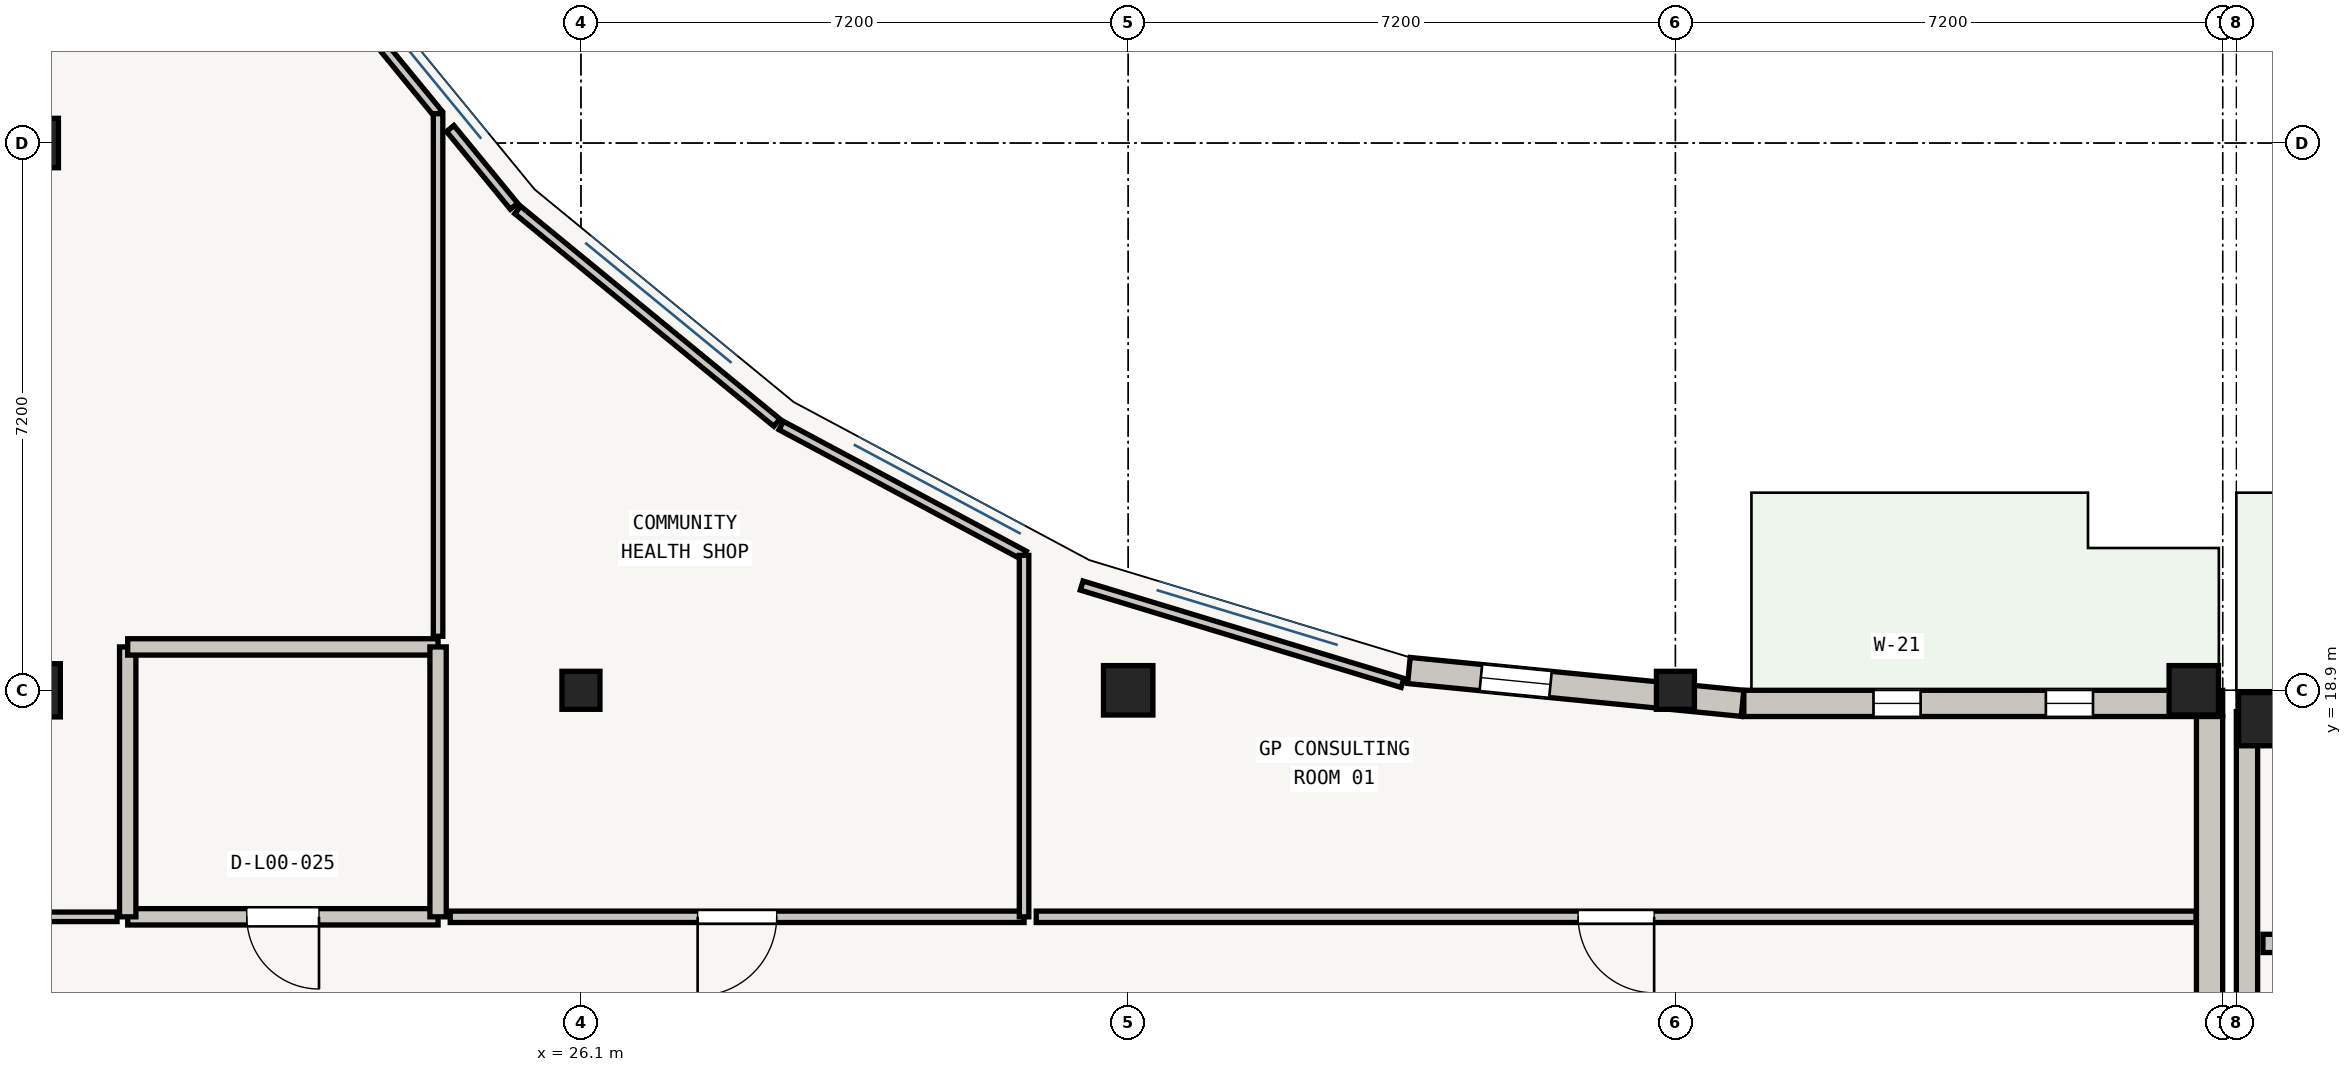
"""IFC4 building model, lengths in metres.
Left out: names, types, materials, properties, quantities, classifications, styles, units other than length and angle.
Written with IfcOpenShell. Run it as: python <this file> out.ifc"""

import sys

from ifc_helpers import new_model, si_unit, direction, frame, frame_2d, origin, origin_2d, place, context, subcontext, project, spatial, rectangle, extrude, element, fill, save


model = new_model("IFC4")
c1 = context("Model", 3, precision=1e-05, world=origin(), true_north=direction((0.0, 1.0)))
c2 = subcontext(c1, "Body", "Model", "MODEL_VIEW")
j1 = project(units=[si_unit("LENGTHUNIT", "METRE"), si_unit("PLANEANGLEUNIT", "RADIAN")], contexts=[c1])
p1 = place(None, origin())
s1 = spatial("IfcSite", under=j1, at=p1, CompositionType="ELEMENT")
p2 = place(p1, origin())
s2 = spatial("IfcBuilding", under=s1, at=p2, CompositionType="ELEMENT")
p3 = place(p2, origin())
s3 = spatial("IfcBuildingStorey", under=s2, at=p3, CompositionType="ELEMENT", Elevation=0.0)
p4 = place(p3, frame((18.9, 18.9, 0.0), z_axis=(0.0, 0.0, 1.0), x_axis=(1.0, 0.0, 0.0)))
e1 = element("IfcColumn", 1, at=p4, inside=s3, PredefinedType="COLUMN", context=c2, shape_type="SweptSolid", body=[
    extrude(rectangle(XDim=0.7, YDim=0.7, at=origin_2d()), origin(), (0.0, 0.0, 1.0), 4.22),
])
p5 = place(p3, frame((18.9, 26.1, 0.0), z_axis=(0.0, 0.0, 1.0), x_axis=(1.0, 0.0, 0.0)))
e2 = element("IfcColumn", 2, at=p5, inside=s3, PredefinedType="COLUMN", context=c2, shape_type="SweptSolid", body=[
    extrude(rectangle(XDim=0.65, YDim=0.65, at=origin_2d()), origin(), (0.0, 0.0, 1.0), 4.22),
])
p6 = place(p3, frame((26.1, 18.9, 0.0), z_axis=(0.0, 0.0, 1.0), x_axis=(1.0, 0.0, 0.0)))
e3 = element("IfcColumn", 3, at=p6, inside=s3, PredefinedType="COLUMN", context=c2, shape_type="SweptSolid", body=[
    extrude(rectangle(XDim=0.5, YDim=0.5, at=origin_2d()), origin(), (0.0, 0.0, 1.0), 4.22),
])
p7 = place(p3, frame((33.3, 18.9, 0.0), z_axis=(0.0, 0.0, 1.0), x_axis=(1.0, 0.0, 0.0)))
e4 = element("IfcColumn", 4, at=p7, inside=s3, PredefinedType="COLUMN", context=c2, shape_type="SweptSolid", body=[
    extrude(rectangle(XDim=0.65, YDim=0.65, at=origin_2d()), origin(), (0.0, 0.0, 1.0), 4.22),
])
p8 = place(p3, frame((40.5, 18.9, 0.0), z_axis=(0.0, 0.0, 1.0), x_axis=(1.0, 0.0, 0.0)))
e5 = element("IfcColumn", 5, at=p8, inside=s3, PredefinedType="COLUMN", context=c2, shape_type="SweptSolid", body=[
    extrude(rectangle(XDim=0.5, YDim=0.5, at=origin_2d()), origin(), (0.0, 0.0, 1.0), 4.22),
])
p9 = place(p3, frame((47.32, 18.9, 0.0), z_axis=(0.0, 0.0, 1.0), x_axis=(1.0, 0.0, 0.0)))
e6 = element("IfcColumn", 6, at=p9, inside=s3, PredefinedType="COLUMN", context=c2, shape_type="SweptSolid", body=[
    extrude(rectangle(XDim=0.65, YDim=0.65, at=origin_2d()), origin(), (0.0, 0.0, 1.0), 4.22),
])
p10 = place(p3, frame((48.26, 18.52, 0.0), z_axis=(0.0, 0.0, 1.0), x_axis=(1.0, 0.0, 0.0)))
e7 = element("IfcColumn", 7, at=p10, inside=s3, PredefinedType="COLUMN", context=c2, shape_type="SweptSolid", body=[
    extrude(rectangle(XDim=0.7, YDim=0.7, at=origin_2d()), origin(), (0.0, 0.0, 1.0), 4.185),
])
p11 = place(p3, frame((36.994, 19.161, 0.0), z_axis=(0.0, 0.0, 1.0), x_axis=(0.995183522218, -0.098029368588, 0.0)))
e8 = element("IfcWall", 8, at=p11, inside=s3, PredefinedType="SOLIDWALL", context=c2, shape_type="SweptSolid", body=[
    extrude(rectangle(XDim=4.411, YDim=0.345, at=frame_2d((2.205, 0.0))), origin(), (0.0, 0.0, 1.0), 3.255),
])
p12 = place(p11, frame((0.951, 0.0, 0.55)))
e9 = element("IfcOpeningElement", 9, at=p12, cuts=e8, PredefinedType="OPENING", context=c2, shape_type="SweptSolid", body=[
    extrude(rectangle(XDim=0.92, YDim=2.1, at=frame_2d((0.46, 1.05))), frame((0.0, 0.172, 0.0), z_axis=(0.0, -1.0, 0.0), x_axis=(1.0, 0.0, 0.0)), (0.0, 0.0, 1.0), 0.345),
])
p13 = place(p3, frame((41.4, 18.728, 0.0), z_axis=(0.0, 0.0, 1.0), x_axis=(1.0, 0.0, 0.0)))
e10 = element("IfcWall", 10, at=p13, inside=s3, PredefinedType="SOLIDWALL", context=c2, shape_type="SweptSolid", body=[
    extrude(rectangle(XDim=6.3, YDim=0.345, at=frame_2d((3.15, 0.0))), origin(), (0.0, 0.0, 1.0), 3.625),
])
p14 = place(p13, frame((1.706, 0.0, 0.55)))
e11 = element("IfcOpeningElement", 11, at=p14, cuts=e10, PredefinedType="OPENING", context=c2, shape_type="SweptSolid", body=[
    extrude(rectangle(XDim=0.62, YDim=2.08, at=frame_2d((0.31, 1.04))), frame((0.0, 0.172, 0.0), z_axis=(0.0, -1.0, 0.0), x_axis=(1.0, 0.0, 0.0)), (0.0, 0.0, 1.0), 0.345),
])
p15 = place(p13, frame((3.974, 0.0, 0.55)))
e12 = element("IfcOpeningElement", 12, at=p15, cuts=e10, PredefinedType="OPENING", context=c2, shape_type="SweptSolid", body=[
    extrude(rectangle(XDim=0.62, YDim=2.08, at=frame_2d((0.31, 1.04))), frame((0.0, 0.172, 0.0), z_axis=(0.0, -1.0, 0.0), x_axis=(1.0, 0.0, 0.0)), (0.0, 0.0, 1.0), 0.345),
])
p16 = place(p3, frame((47.528, 18.555, 0.0), z_axis=(0.0, 0.0, 1.0), x_axis=(0.0, -1.0, 0.0)))
e13 = element("IfcWall", 13, at=p16, inside=s3, PredefinedType="SOLIDWALL", context=c2, shape_type="SweptSolid", body=[
    extrude(rectangle(XDim=6.855, YDim=0.345, at=frame_2d((3.427, 0.0))), origin(), (0.0, 0.0, 1.0), 3.605),
])
p17 = place(p3, frame((48.02, 11.7, 0.0), z_axis=(0.0, 0.0, 1.0), x_axis=(0.0, 1.0, 0.0)))
e14 = element("IfcWall", 14, at=p17, inside=s3, PredefinedType="STANDARD", context=c2, shape_type="SweptSolid", body=[
    extrude(rectangle(XDim=6.92, YDim=0.28, at=frame_2d((3.46, 0.0))), origin(), (0.0, 0.0, 1.0), 3.55),
])
p18 = place(p3, frame((24.22, 15.92, 0.0), z_axis=(0.0, 0.0, 1.0), x_axis=(-1.0, 0.0, 0.0)))
e15 = element("IfcWall", 15, at=p18, inside=s3, PredefinedType="PLUMBINGWALL", context=c2, shape_type="SweptSolid", body=[
    extrude(rectangle(XDim=4.083, YDim=0.215, at=frame_2d((2.042, 0.0))), origin(), (0.0, 0.0, 1.0), 3.24),
])
p19 = place(p18, frame((1.567, 0.0, 0.0)))
e16 = element("IfcOpeningElement", 16, at=p19, cuts=e15, PredefinedType="OPENING", context=c2, shape_type="SweptSolid", body=[
    extrude(rectangle(XDim=0.95, YDim=2.05, at=frame_2d((0.475, 1.025))), frame((0.0, 0.107, 0.0), z_axis=(0.0, -1.0, 0.0), x_axis=(1.0, 0.0, 0.0)), (0.0, 0.0, 1.0), 0.215),
])
p20 = place(p3, frame((20.136, 15.92, 0.0), z_axis=(0.0, 0.0, 1.0), x_axis=(0.0, 1.0, 0.0)))
e17 = element("IfcWall", 17, at=p20, inside=s3, PredefinedType="PLUMBINGWALL", context=c2, shape_type="SweptSolid", body=[
    extrude(rectangle(XDim=3.551, YDim=0.215, at=frame_2d((1.775, 0.0))), origin(), (0.0, 0.0, 1.0), 3.24),
])
p21 = place(p3, frame((20.136, 19.471, 0.0), z_axis=(0.0, 0.0, 1.0), x_axis=(1.0, 0.0, 0.0)))
e18 = element("IfcWall", 18, at=p21, inside=s3, PredefinedType="PLUMBINGWALL", context=c2, shape_type="SweptSolid", body=[
    extrude(rectangle(XDim=4.083, YDim=0.215, at=frame_2d((2.042, 0.0))), origin(), (0.0, 0.0, 1.0), 3.24),
])
p22 = place(p3, frame((24.22, 19.471, 0.0), z_axis=(0.0, 0.0, 1.0), x_axis=(0.0, -1.0, 0.0)))
e19 = element("IfcWall", 19, at=p22, inside=s3, PredefinedType="PLUMBINGWALL", context=c2, shape_type="SweptSolid", body=[
    extrude(rectangle(XDim=3.551, YDim=0.215, at=frame_2d((1.775, 0.0))), origin(), (0.0, 0.0, 1.0), 3.24),
])
p23 = place(p3, frame((22.421, 28.678, 0.0), z_axis=(0.0, 0.0, 1.0), x_axis=(0.634381268995, -0.773020313801, 0.0)))
e20 = element("IfcWall", 20, at=p23, inside=s3, PredefinedType="PARTITIONING", context=c2, shape_type="SweptSolid", body=[
    extrude(rectangle(XDim=2.835, YDim=0.125, at=frame_2d((1.417, 0.0))), origin(), (0.0, 0.0, 1.0), 3.24),
])
p24 = place(p3, frame((24.22, 26.486, 0.0), z_axis=(0.0, 0.0, 1.0), x_axis=(0.0, -1.0, 0.0)))
e21 = element("IfcWall", 21, at=p24, inside=s3, PredefinedType="PARTITIONING", context=c2, shape_type="SweptSolid", body=[
    extrude(rectangle(XDim=6.875, YDim=0.125, at=frame_2d((3.438, 0.0))), origin(), (0.0, 0.0, 1.0), 3.24),
])
p25 = place(p3, frame((19.997, 15.92, 0.0), z_axis=(0.0, 0.0, 1.0), x_axis=(-1.0, 0.0, 0.0)))
e22 = element("IfcWall", 22, at=p25, inside=s3, PredefinedType="PARTITIONING", context=c2, shape_type="SweptSolid", body=[
    extrude(rectangle(XDim=3.327, YDim=0.125, at=frame_2d((1.663, 0.0))), origin(), (0.0, 0.0, 1.0), 3.24),
])
p26 = place(p3, frame((31.93, 15.92, 0.0), z_axis=(0.0, 0.0, 1.0), x_axis=(-1.0, 0.0, 0.0)))
e23 = element("IfcWall", 23, at=p26, inside=s3, PredefinedType="PARTITIONING", context=c2, shape_type="SweptSolid", body=[
    extrude(rectangle(XDim=7.55, YDim=0.15, at=frame_2d((3.775, 0.0))), origin(), (0.0, 0.0, 1.0), 3.24),
])
p27 = place(p26, frame((3.255, 0.0, 0.0)))
e24 = element("IfcOpeningElement", 24, at=p27, cuts=e23, PredefinedType="OPENING", context=c2, shape_type="SweptSolid", body=[
    extrude(rectangle(XDim=1.04, YDim=2.05, at=frame_2d((0.52, 1.025))), frame((0.0, 0.075, 0.0), z_axis=(0.0, -1.0, 0.0), x_axis=(1.0, 0.0, 0.0)), (0.0, 0.0, 1.0), 0.15),
])
p28 = place(p3, frame((25.268, 25.219, 0.0), z_axis=(0.0, 0.0, 1.0), x_axis=(0.773026739032, -0.634373439499, 0.0)))
e25 = element("IfcWall", 25, at=p28, inside=s3, PredefinedType="PARTITIONING", context=c2, shape_type="SweptSolid", body=[
    extrude(rectangle(XDim=4.411, YDim=0.125, at=frame_2d((2.206, 0.0))), origin(), (0.0, 0.0, 1.0), 3.24),
])
p29 = place(p3, frame((28.735, 22.383, 0.0), z_axis=(0.0, 0.0, 1.0), x_axis=(0.881912348796, -0.471413416273, 0.0)))
e26 = element("IfcWall", 26, at=p29, inside=s3, PredefinedType="PARTITIONING", context=c2, shape_type="SweptSolid", body=[
    extrude(rectangle(XDim=3.623, YDim=0.125, at=frame_2d((1.812, 0.0))), origin(), (0.0, 0.0, 1.0), 3.24),
])
p30 = place(p3, frame((31.93, 20.675, 0.0), z_axis=(0.0, 0.0, 1.0), x_axis=(0.0, -1.0, 0.0)))
e27 = element("IfcWall", 27, at=p30, inside=s3, PredefinedType="PARTITIONING", context=c2, shape_type="SweptSolid", body=[
    extrude(rectangle(XDim=4.755, YDim=0.125, at=frame_2d((2.378, 0.0))), origin(), (0.0, 0.0, 1.0), 3.24),
])
p31 = place(p3, frame((24.38, 26.291, 0.0), z_axis=(0.0, 0.0, 1.0), x_axis=(0.634432512687, -0.77297825768, 0.0)))
e28 = element("IfcWall", 28, at=p31, inside=s3, PredefinedType="PARTITIONING", context=c2, shape_type="SweptSolid", body=[
    extrude(rectangle(XDim=1.323, YDim=0.125, at=frame_2d((0.662, 0.0))), origin(), (0.0, 0.0, 1.0), 3.24),
])
p32 = place(p3, frame((47.35, 15.92, 0.0), z_axis=(0.0, 0.0, 1.0), x_axis=(-1.0, 0.0, 0.0)))
e29 = element("IfcWall", 29, at=p32, inside=s3, PredefinedType="PARTITIONING", context=c2, shape_type="SweptSolid", body=[
    extrude(rectangle(XDim=15.26, YDim=0.15, at=frame_2d((7.63, 0.0))), origin(), (0.0, 0.0, 1.0), 3.24),
])
p33 = place(p32, frame((7.13, 0.0, 0.0)))
e30 = element("IfcOpeningElement", 30, at=p33, cuts=e29, PredefinedType="OPENING", context=c2, shape_type="SweptSolid", body=[
    extrude(rectangle(XDim=1.0, YDim=2.05, at=frame_2d((0.5, 1.025))), frame((0.0, 0.075, 0.0), z_axis=(0.0, -1.0, 0.0), x_axis=(1.0, 0.0, 0.0)), (0.0, 0.0, 1.0), 0.15),
])
p34 = place(p3, frame((32.688, 20.278, 0.0), z_axis=(0.0, 0.0, 1.0), x_axis=(0.956933582882, -0.290306937487, 0.0)))
e31 = element("IfcWall", 31, at=p34, inside=s3, PredefinedType="PARTITIONING", context=c2, shape_type="SweptSolid", body=[
    extrude(rectangle(XDim=4.411, YDim=0.125, at=frame_2d((2.206, 0.0))), origin(), (0.0, 0.0, 1.0), 3.24),
])
p35 = place(p3, frame((105.13, 15.57, 0.0), z_axis=(0.0, 0.0, 1.0), x_axis=(-1.0, 0.0, 0.0)))
e32 = element("IfcWall", 32, at=p35, inside=s3, PredefinedType="SOLIDWALL", context=c2, shape_type="SweptSolid", body=[
    extrude(rectangle(XDim=56.9, YDim=0.24, at=frame_2d((28.45, 0.0))), origin(), (0.0, 0.0, 1.0), 3.205),
])
p36 = place(p35, frame((27.775, 0.0, 0.0)))
e33 = element("IfcOpeningElement", 33, at=p36, cuts=e32, PredefinedType="OPENING", context=c2, shape_type="SweptSolid", body=[
    extrude(rectangle(XDim=1.35, YDim=2.1, at=frame_2d((0.675, 1.05))), frame((0.0, 0.12, 0.0), z_axis=(0.0, -1.0, 0.0), x_axis=(1.0, 0.0, 0.0)), (0.0, 0.0, 1.0), 0.24),
])
p37 = place(p3, frame((48.23, 18.55, 0.0), z_axis=(0.0, 0.0, 1.0), x_axis=(1.0, 0.0, 0.0)))
e34 = element("IfcWall", 34, at=p37, inside=s3, PredefinedType="PARTITIONING", context=c2, shape_type="SweptSolid", body=[
    extrude(rectangle(XDim=56.9, YDim=0.125, at=frame_2d((28.45, 0.0))), origin(), (0.0, 0.0, 1.0), 3.205),
])
p38 = place(p12, origin())
e35 = element("IfcWindow", 35, at=p38, inside=s3, PartitioningType="DOUBLE_PANEL_VERTICAL", PredefinedType="WINDOW", context=c2, shape_type="SweptSolid", body=[
    extrude(rectangle(XDim=0.92, YDim=2.1, at=frame_2d((0.46, 1.05))), frame((0.0, 0.03, 0.0), z_axis=(0.0, -1.0, 0.0), x_axis=(1.0, 0.0, 0.0)), (0.0, 0.0, 1.0), 0.06),
])
fill(e9, e35)
p39 = place(p14, origin())
e36 = element("IfcWindow", 36, at=p39, inside=s3, PartitioningType="SINGLE_PANEL", PredefinedType="WINDOW", context=c2, shape_type="SweptSolid", body=[
    extrude(rectangle(XDim=0.62, YDim=2.08, at=frame_2d((0.31, 1.04))), frame((0.0, 0.03, 0.0), z_axis=(0.0, -1.0, 0.0), x_axis=(1.0, 0.0, 0.0)), (0.0, 0.0, 1.0), 0.06),
])
fill(e11, e36)
p40 = place(p15, origin())
e37 = element("IfcWindow", 37, at=p40, inside=s3, PartitioningType="SINGLE_PANEL", PredefinedType="WINDOW", context=c2, shape_type="SweptSolid", body=[
    extrude(rectangle(XDim=0.62, YDim=2.08, at=frame_2d((0.31, 1.04))), frame((0.0, 0.03, 0.0), z_axis=(0.0, -1.0, 0.0), x_axis=(1.0, 0.0, 0.0)), (0.0, 0.0, 1.0), 0.06),
])
fill(e12, e37)
p41 = place(p19, origin())
e38 = element("IfcDoor", 38, at=p41, inside=s3, OperationType="SINGLE_SWING_LEFT", PredefinedType="DOOR", context=c2, shape_type="SweptSolid", body=[
    extrude(rectangle(XDim=0.95, YDim=2.05, at=frame_2d((0.475, 1.025))), frame((0.0, 0.025, 0.0), z_axis=(0.0, -1.0, 0.0), x_axis=(1.0, 0.0, 0.0)), (0.0, 0.0, 1.0), 0.05),
])
fill(e16, e38)
p42 = place(p27, origin())
e39 = element("IfcDoor", 39, at=p42, inside=s3, OperationType="SINGLE_SWING_RIGHT", PredefinedType="DOOR", context=c2, shape_type="SweptSolid", body=[
    extrude(rectangle(XDim=1.04, YDim=2.05, at=frame_2d((0.52, 1.025))), frame((0.0, 0.025, 0.0), z_axis=(0.0, -1.0, 0.0), x_axis=(1.0, 0.0, 0.0)), (0.0, 0.0, 1.0), 0.05),
])
fill(e24, e39)
p43 = place(p33, origin())
e40 = element("IfcDoor", 40, at=p43, inside=s3, OperationType="SINGLE_SWING_LEFT", PredefinedType="DOOR", context=c2, shape_type="SweptSolid", body=[
    extrude(rectangle(XDim=1.0, YDim=2.05, at=frame_2d((0.5, 1.025))), frame((0.0, 0.025, 0.0), z_axis=(0.0, -1.0, 0.0), x_axis=(1.0, 0.0, 0.0)), (0.0, 0.0, 1.0), 0.05),
])
fill(e30, e40)
save(model, sys.argv[1])
